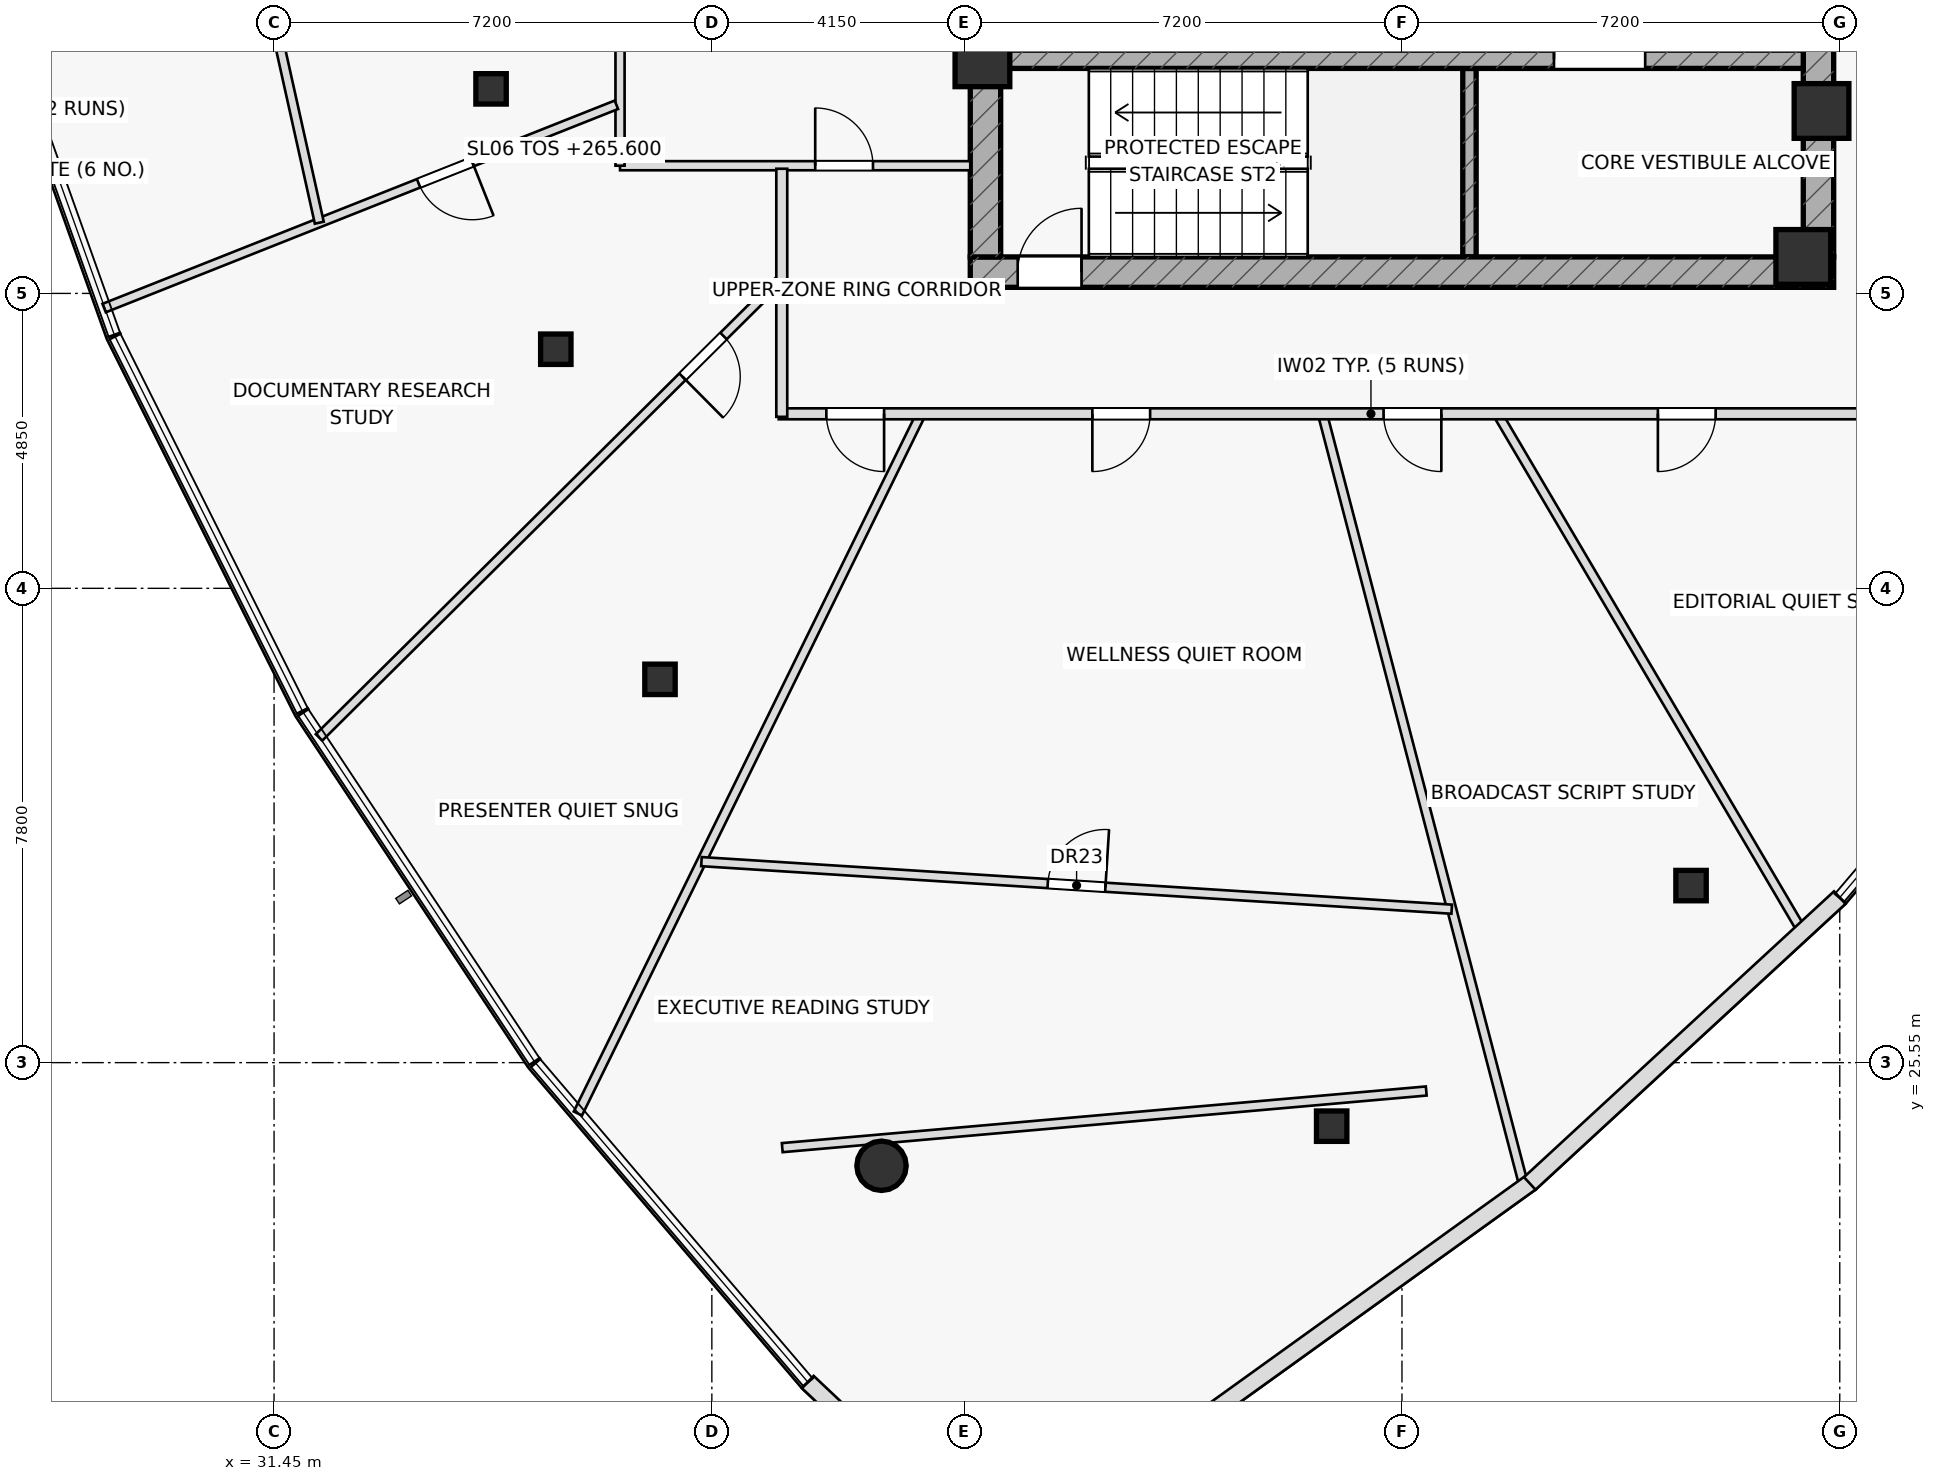
"""IFC4 building model, lengths in metres.
Left out: names, types, materials, properties, quantities, classifications, styles, units other than length and angle.
Written with IfcOpenShell. Run it as: python <this file> out.ifc"""

import sys

from ifc_helpers import new_model, si_unit, direction, frame, frame_2d, origin, origin_2d, place, context, subcontext, project, spatial, rectangle, hollow_rectangle, hollow_circle, extrude, element, fill, save


model = new_model("IFC4")
c1 = context("Model", 3, precision=1e-05, world=origin(), true_north=direction((0.0, 1.0)))
c2 = subcontext(c1, "Body", "Model", "MODEL_VIEW")
j1 = project(units=[si_unit("LENGTHUNIT", "METRE"), si_unit("PLANEANGLEUNIT", "RADIAN")], contexts=[c1])
p1 = place(None, origin())
s1 = spatial("IfcSite", under=j1, at=p1, CompositionType="ELEMENT")
p2 = place(p1, origin())
s2 = spatial("IfcBuilding", under=s1, at=p2, CompositionType="ELEMENT")
p3 = place(p2, frame((0.0, 0.0, 265.6)))
s3 = spatial("IfcBuildingStorey", under=s2, at=p3, CompositionType="ELEMENT", Elevation=265.6)
p4 = place(p3, frame((51.11, 38.8, 0.0), z_axis=(0.0, 0.0, 1.0), x_axis=(0.0, 1.0, 0.0)))
e1 = element("IfcWall", 1, at=p4, inside=s3, PredefinedType="SHEAR", context=c2, shape_type="SweptSolid", body=[
    extrude(rectangle(XDim=3.1, YDim=0.22, at=frame_2d((1.55, 0.0))), origin(), (0.0, 0.0, 1.0), 3.65),
])
p5 = place(p3, frame((42.9, 38.55, 0.0), z_axis=(0.0, 0.0, 1.0), x_axis=(1.0, 0.0, 0.0)))
e2 = element("IfcWall", 2, at=p5, inside=s3, PredefinedType="SHEAR", context=c2, shape_type="SweptSolid", body=[
    extrude(rectangle(XDim=14.2, YDim=0.5, at=frame_2d((7.1, 0.0))), origin(), (0.0, 0.0, 1.0), 3.65),
])
p6 = place(p5, frame((0.78, 0.0, 0.0)))
e3 = element("IfcOpeningElement", 3, at=p6, cuts=e2, PredefinedType="OPENING", context=c2, shape_type="SweptSolid", body=[
    extrude(rectangle(XDim=1.05, YDim=2.2, at=frame_2d((0.525, 1.1))), frame((0.0, 0.26, 0.0), z_axis=(0.0, -1.0, 0.0), x_axis=(1.0, 0.0, 0.0)), (0.0, 0.0, 1.0), 0.52),
])
p7 = place(p3, frame((43.15, 38.8, 0.0), z_axis=(0.0, 0.0, 1.0), x_axis=(0.0, 1.0, 0.0)))
e4 = element("IfcWall", 4, at=p7, inside=s3, PredefinedType="SHEAR", context=c2, shape_type="SweptSolid", body=[
    extrude(rectangle(XDim=12.4, YDim=0.5, at=frame_2d((6.2, 0.0))), origin(), (0.0, 0.0, 1.0), 3.65),
])
p8 = place(p3, frame((56.85, 38.8, 0.0), z_axis=(0.0, 0.0, 1.0), x_axis=(0.0, 1.0, 0.0)))
e5 = element("IfcWall", 5, at=p8, inside=s3, PredefinedType="SHEAR", context=c2, shape_type="SweptSolid", body=[
    extrude(rectangle(XDim=12.4, YDim=0.5, at=frame_2d((6.2, 0.0))), origin(), (0.0, 0.0, 1.0), 3.65),
])
p9 = place(p8, frame((3.85, 0.0, 0.0)))
e6 = element("IfcOpeningElement", 6, at=p9, cuts=e5, PredefinedType="OPENING", context=c2, shape_type="SweptSolid", body=[
    extrude(rectangle(XDim=1.5, YDim=2.2, at=frame_2d((0.75, 1.1))), frame((0.0, 0.26, 0.0), z_axis=(0.0, -1.0, 0.0), x_axis=(1.0, 0.0, 0.0)), (0.0, 0.0, 1.0), 0.52),
])
p10 = place(p3, frame((43.4, 42.05, 0.0), z_axis=(0.0, 0.0, 1.0), x_axis=(1.0, 0.0, 0.0)))
e7 = element("IfcWall", 7, at=p10, inside=s3, PredefinedType="SHEAR", context=c2, shape_type="SweptSolid", body=[
    extrude(rectangle(XDim=13.2, YDim=0.3, at=frame_2d((6.6, 0.0))), origin(), (0.0, 0.0, 1.0), 3.65),
])
p11 = place(p10, frame((9.1, 0.0, 0.0)))
e8 = element("IfcOpeningElement", 8, at=p11, cuts=e7, PredefinedType="OPENING", context=c2, shape_type="SweptSolid", body=[
    extrude(rectangle(XDim=1.5, YDim=2.2, at=frame_2d((0.75, 1.1))), frame((0.0, 0.16, 0.0), z_axis=(0.0, -1.0, 0.0), x_axis=(1.0, 0.0, 0.0)), (0.0, 0.0, 1.0), 0.32),
])
for number, where, z_axis, x_axis in (
    (9, (43.1, 42.05, 0.0), (0.0, 0.0, 1.0), (1.0, 0.0, 0.0)),
    (10, (56.9, 41.2, 0.0), (0.0, 0.0, 1.0), (1.0, 0.0, 0.0)),
    (11, (56.6, 38.8, 0.0), (0.0, 0.0, 1.0), (1.0, 0.0, 0.0)),
):
    element("IfcColumn", number, at=place(p3, frame(where, z_axis=z_axis, x_axis=x_axis)), inside=s3, PredefinedType="COLUMN", context=c2, shape_type="SweptSolid", body=[
        extrude(rectangle(XDim=0.9, YDim=0.9, at=origin_2d()), origin(), (0.0, 0.0, 1.0), 3.65),
    ])
for number, where, z_axis, x_axis in (
    (12, (35.019, 41.564, 0.0), (0.0, 0.0, 1.0), (1.0, 0.0, 0.0)),
    (13, (36.083, 37.282, 0.0), (0.0, 0.0, 1.0), (1.0, 0.0, 0.0)),
    (14, (37.797, 31.853, 0.0), (0.0, 0.0, 1.0), (1.0, 0.0, 0.0)),
):
    element("IfcColumn", number, at=place(p3, frame(where, z_axis=z_axis, x_axis=x_axis)), inside=s3, PredefinedType="COLUMN", context=c2, shape_type="SweptSolid", body=[
        extrude(hollow_rectangle(XDim=0.5, YDim=0.5, WallThickness=0.03, at=origin_2d()), origin(), (0.0, 0.0, 1.0), 3.65),
    ])
p12 = place(p3, frame((41.44, 23.854, 0.0), z_axis=(0.0, 0.0, 1.0), x_axis=(1.0, 0.0, 0.0)))
e15 = element("IfcColumn", 15, at=p12, inside=s3, PredefinedType="COLUMN", context=c2, shape_type="SweptSolid", body=[
    extrude(hollow_circle(Radius=0.406, WallThickness=0.036, at=origin_2d()), origin(), (0.0, 0.0, 1.0), 3.65),
])
for number, where, z_axis, x_axis in (
    (16, (48.844, 24.505, 0.0), (0.0, 0.0, 1.0), (1.0, 0.0, 0.0)),
    (17, (54.754, 28.462, 0.0), (0.0, 0.0, 1.0), (1.0, 0.0, 0.0)),
):
    element("IfcColumn", number, at=place(p3, frame(where, z_axis=z_axis, x_axis=x_axis)), inside=s3, PredefinedType="COLUMN", context=c2, shape_type="SweptSolid", body=[
        extrude(hollow_rectangle(XDim=0.5, YDim=0.5, WallThickness=0.03, at=origin_2d()), origin(), (0.0, 0.0, 1.0), 3.65),
    ])
p13 = place(p3, frame((39.808, 24.152, 0.0), z_axis=(0.0, 0.0, 1.0), x_axis=(0.996153584085, 0.087624408208, 0.0)))
e18 = element("IfcWall", 18, at=p13, inside=s3, PredefinedType="PARTITIONING", context=c2, shape_type="SweptSolid", body=[
    extrude(rectangle(XDim=10.632, YDim=0.15, at=frame_2d((5.316, 0.0))), origin(), (0.0, 0.0, 1.0), 3.175),
])
p14 = place(p3, frame((37.14, 40.3, 0.0), z_axis=(0.0, 0.0, 1.0), x_axis=(1.0, 0.0, 0.0)))
e19 = element("IfcWall", 19, at=p14, inside=s3, PredefinedType="PARTITIONING", context=c2, shape_type="SweptSolid", body=[
    extrude(rectangle(XDim=5.76, YDim=0.15, at=frame_2d((2.88, 0.0))), origin(), (0.0, 0.0, 1.0), 3.075),
])
p15 = place(p14, frame((3.21, 0.0, 0.0)))
e20 = element("IfcOpeningElement", 20, at=p15, cuts=e19, PredefinedType="OPENING", context=c2, shape_type="SweptSolid", body=[
    extrude(rectangle(XDim=0.95, YDim=2.05, at=frame_2d((0.475, 1.025))), frame((0.0, 0.085, 0.0), z_axis=(0.0, -1.0, 0.0), x_axis=(1.0, 0.0, 0.0)), (0.0, 0.0, 1.0), 0.17),
])
p16 = place(p3, frame((37.14, 40.3, 0.0), z_axis=(0.0, 0.0, 1.0), x_axis=(0.0, 1.0, 0.0)))
e21 = element("IfcWall", 21, at=p16, inside=s3, PredefinedType="PARTITIONING", context=c2, shape_type="SweptSolid", body=[
    extrude(rectangle(XDim=7.58, YDim=0.15, at=frame_2d((3.79, 0.0))), origin(), (0.0, 0.0, 1.0), 3.65),
])
p17 = place(p3, frame((37.08, 41.302, 0.0), z_axis=(0.0, 0.0, 1.0), x_axis=(-0.929502291, -0.368816337797, 0.0)))
e22 = element("IfcWall", 22, at=p17, inside=s3, PredefinedType="PARTITIONING", context=c2, shape_type="SweptSolid", body=[
    extrude(rectangle(XDim=9.063, YDim=0.15, at=frame_2d((4.532, 0.0))), origin(), (0.0, 0.0, 1.0), 3.075),
])
p18 = place(p17, frame((2.55, 0.0, 0.0)))
e23 = element("IfcOpeningElement", 23, at=p18, cuts=e22, PredefinedType="OPENING", context=c2, shape_type="SweptSolid", body=[
    extrude(rectangle(XDim=0.95, YDim=2.05, at=frame_2d((0.475, 1.025))), frame((0.0, 0.085, 0.0), z_axis=(0.0, -1.0, 0.0), x_axis=(1.0, 0.0, 0.0)), (0.0, 0.0, 1.0), 0.17),
])
p19 = place(p3, frame((39.8, 38.45, 0.0), z_axis=(0.0, 0.0, 1.0), x_axis=(-0.709811227193, -0.704391951793, 0.0)))
e24 = element("IfcWall", 24, at=p19, inside=s3, PredefinedType="PARTITIONING", context=c2, shape_type="SweptSolid", body=[
    extrude(rectangle(XDim=10.722, YDim=0.15, at=frame_2d((5.361, 0.0))), origin(), (0.0, 0.0, 1.0), 3.075),
])
p20 = place(p19, frame((1.35, 0.0, 0.0)))
e25 = element("IfcOpeningElement", 25, at=p20, cuts=e24, PredefinedType="OPENING", context=c2, shape_type="SweptSolid", body=[
    extrude(rectangle(XDim=0.95, YDim=2.05, at=frame_2d((0.475, 1.025))), frame((0.0, 0.085, 0.0), z_axis=(0.0, -1.0, 0.0), x_axis=(1.0, 0.0, 0.0)), (0.0, 0.0, 1.0), 0.17),
])
p21 = place(p3, frame((42.092, 36.22, 0.0), z_axis=(0.0, 0.0, 1.0), x_axis=(-0.440465548738, -0.89776951406, 0.0)))
e26 = element("IfcWall", 26, at=p21, inside=s3, PredefinedType="PARTITIONING", context=c2, shape_type="SweptSolid", body=[
    extrude(rectangle(XDim=12.817, YDim=0.15, at=frame_2d((6.409, 0.0))), origin(), (0.0, 0.0, 1.0), 3.175),
])
p22 = place(p3, frame((48.692, 36.22, 0.0), z_axis=(0.0, 0.0, 1.0), x_axis=(0.252552587475, -0.967583169841, 0.0)))
e27 = element("IfcWall", 27, at=p22, inside=s3, PredefinedType="PARTITIONING", context=c2, shape_type="SweptSolid", body=[
    extrude(rectangle(XDim=13.156, YDim=0.15, at=frame_2d((6.578, 0.0))), origin(), (0.0, 0.0, 1.0), 3.175),
])
p23 = place(p3, frame((51.571, 36.22, 0.0), z_axis=(0.0, 0.0, 1.0), x_axis=(0.507452319083, -0.861679838372, 0.0)))
e28 = element("IfcWall", 28, at=p23, inside=s3, PredefinedType="PARTITIONING", context=c2, shape_type="SweptSolid", body=[
    extrude(rectangle(XDim=9.898, YDim=0.15, at=frame_2d((4.949, 0.0))), origin(), (0.0, 0.0, 1.0), 3.075),
])
p24 = place(p3, frame((30.413, 47.355, 0.0), z_axis=(0.0, 0.0, 1.0), x_axis=(0.217501820027, -0.976059915315, 0.0)))
e29 = element("IfcWall", 29, at=p24, inside=s3, PredefinedType="PARTITIONING", context=c2, shape_type="SweptSolid", body=[
    extrude(rectangle(XDim=8.188, YDim=0.15, at=frame_2d((4.094, 0.0))), origin(), (0.0, 0.0, 1.0), 3.65),
])
p25 = place(p24, frame((3.619, 0.0, 0.0)))
e30 = element("IfcOpeningElement", 30, at=p25, cuts=e29, PredefinedType="OPENING", context=c2, shape_type="SweptSolid", body=[
    extrude(rectangle(XDim=0.95, YDim=2.05, at=frame_2d((0.475, 1.025))), frame((0.0, 0.085, 0.0), z_axis=(0.0, -1.0, 0.0), x_axis=(1.0, 0.0, 0.0)), (0.0, 0.0, 1.0), 0.17),
])
p26 = place(p3, frame((38.479, 28.856, 0.0), z_axis=(0.0, 0.0, 1.0), x_axis=(0.997995384926, -0.063286741629, 0.0)))
e31 = element("IfcWall", 31, at=p26, inside=s3, PredefinedType="PARTITIONING", context=c2, shape_type="SweptSolid", body=[
    extrude(rectangle(XDim=12.364, YDim=0.15, at=frame_2d((6.182, 0.0))), origin(), (0.0, 0.0, 1.0), 3.175),
])
p27 = place(p26, frame((5.707, 0.0, 0.0)))
e32 = element("IfcOpeningElement", 32, at=p27, cuts=e31, PredefinedType="OPENING", context=c2, shape_type="SweptSolid", body=[
    extrude(rectangle(XDim=0.95, YDim=2.05, at=frame_2d((0.475, 1.025))), frame((0.0, 0.085, 0.0), z_axis=(0.0, -1.0, 0.0), x_axis=(1.0, 0.0, 0.0)), (0.0, 0.0, 1.0), 0.17),
])
p28 = place(p3, frame((59.23, 36.22, 0.0), z_axis=(0.0, 0.0, 1.0), x_axis=(-1.0, 0.0, 0.0)))
e33 = element("IfcWall", 33, at=p28, inside=s3, PredefinedType="PARTITIONING", context=c2, shape_type="SweptSolid", body=[
    extrude(rectangle(XDim=19.48, YDim=0.18, at=frame_2d((9.74, 0.0))), origin(), (0.0, 0.0, 1.0), 3.075),
])
p29 = place(p28, frame((4.071, 0.0, 0.0)))
e34 = element("IfcOpeningElement", 34, at=p29, cuts=e33, PredefinedType="OPENING", context=c2, shape_type="SweptSolid", body=[
    extrude(rectangle(XDim=0.95, YDim=2.05, at=frame_2d((0.475, 1.025))), frame((0.0, 0.1, 0.0), z_axis=(0.0, -1.0, 0.0), x_axis=(1.0, 0.0, 0.0)), (0.0, 0.0, 1.0), 0.2),
])
p30 = place(p28, frame((8.583, 0.0, 0.0)))
e35 = element("IfcOpeningElement", 35, at=p30, cuts=e33, PredefinedType="OPENING", context=c2, shape_type="SweptSolid", body=[
    extrude(rectangle(XDim=0.95, YDim=2.05, at=frame_2d((0.475, 1.025))), frame((0.0, 0.1, 0.0), z_axis=(0.0, -1.0, 0.0), x_axis=(1.0, 0.0, 0.0)), (0.0, 0.0, 1.0), 0.2),
])
p31 = place(p28, frame((13.372, 0.0, 0.0)))
e36 = element("IfcOpeningElement", 36, at=p31, cuts=e33, PredefinedType="OPENING", context=c2, shape_type="SweptSolid", body=[
    extrude(rectangle(XDim=0.95, YDim=2.05, at=frame_2d((0.475, 1.025))), frame((0.0, 0.1, 0.0), z_axis=(0.0, -1.0, 0.0), x_axis=(1.0, 0.0, 0.0)), (0.0, 0.0, 1.0), 0.2),
])
p32 = place(p28, frame((17.747, 0.0, 0.0)))
e37 = element("IfcOpeningElement", 37, at=p32, cuts=e33, PredefinedType="OPENING", context=c2, shape_type="SweptSolid", body=[
    extrude(rectangle(XDim=0.95, YDim=2.05, at=frame_2d((0.475, 1.025))), frame((0.0, 0.1, 0.0), z_axis=(0.0, -1.0, 0.0), x_axis=(1.0, 0.0, 0.0)), (0.0, 0.0, 1.0), 0.2),
])
p33 = place(p3, frame((39.8, 36.17, 0.0), z_axis=(0.0, 0.0, 1.0), x_axis=(0.0, 1.0, 0.0)))
e38 = element("IfcWall", 38, at=p33, inside=s3, PredefinedType="PARTITIONING", context=c2, shape_type="SweptSolid", body=[
    extrude(rectangle(XDim=4.08, YDim=0.18, at=frame_2d((2.04, 0.0))), origin(), (0.0, 0.0, 1.0), 3.355),
])
p34 = place(p3, frame((40.228, 20.297, 0.0), z_axis=(0.0, 0.0, 1.0), x_axis=(0.727129573075, -0.686500243233, 0.0)))
e39 = element("IfcWall", 39, at=p34, inside=s3, PredefinedType="STANDARD", context=c2, shape_type="SweptSolid", body=[
    extrude(rectangle(XDim=1.803, YDim=0.28, at=frame_2d((0.901, 0.0))), origin(), (0.0, 0.0, 1.0), 3.65),
])
p35 = place(p3, frame((46.486, 19.527, 0.0), z_axis=(0.0, 0.0, 1.0), x_axis=(0.811838879728, 0.583881523396, 0.0)))
e40 = element("IfcWall", 40, at=p35, inside=s3, PredefinedType="STANDARD", context=c2, shape_type="SweptSolid", body=[
    extrude(rectangle(XDim=6.947, YDim=0.28, at=frame_2d((3.473, 0.0))), origin(), (0.0, 0.0, 1.0), 3.65),
])
p36 = place(p3, frame((52.102, 23.564, 0.0), z_axis=(0.0, 0.0, 1.0), x_axis=(0.735217687078, 0.677831064948, 0.0)))
e41 = element("IfcWall", 41, at=p36, inside=s3, PredefinedType="STANDARD", context=c2, shape_type="SweptSolid", body=[
    extrude(rectangle(XDim=6.935, YDim=0.28, at=frame_2d((3.467, 0.0))), origin(), (0.0, 0.0, 1.0), 3.65),
])
p37 = place(p6, origin())
e42 = element("IfcDoor", 42, at=p37, inside=s3, OperationType="SINGLE_SWING_RIGHT", PredefinedType="DOOR", context=c2, shape_type="SweptSolid", body=[
    extrude(rectangle(XDim=1.05, YDim=2.2, at=frame_2d((0.525, 1.1))), frame((0.0, 0.025, 0.0), z_axis=(0.0, -1.0, 0.0), x_axis=(1.0, 0.0, 0.0)), (0.0, 0.0, 1.0), 0.05),
])
fill(e3, e42)
p38 = place(p11, origin())
e43 = element("IfcDoor", 43, at=p38, inside=s3, OperationType="SINGLE_SWING_LEFT", PredefinedType="DOOR", context=c2, shape_type="SweptSolid", body=[
    extrude(rectangle(XDim=1.5, YDim=2.2, at=frame_2d((0.75, 1.1))), frame((0.0, 0.025, 0.0), z_axis=(0.0, -1.0, 0.0), x_axis=(1.0, 0.0, 0.0)), (0.0, 0.0, 1.0), 0.05),
])
fill(e8, e43)
p39 = place(p15, origin())
e44 = element("IfcDoor", 44, at=p39, inside=s3, OperationType="SINGLE_SWING_LEFT", PredefinedType="DOOR", context=c2, shape_type="SweptSolid", body=[
    extrude(rectangle(XDim=0.95, YDim=2.05, at=frame_2d((0.475, 1.025))), frame((0.0, 0.025, 0.0), z_axis=(0.0, -1.0, 0.0), x_axis=(1.0, 0.0, 0.0)), (0.0, 0.0, 1.0), 0.05),
])
fill(e20, e44)
p40 = place(p18, origin())
e45 = element("IfcDoor", 45, at=p40, inside=s3, OperationType="SINGLE_SWING_LEFT", PredefinedType="DOOR", context=c2, shape_type="SweptSolid", body=[
    extrude(rectangle(XDim=0.95, YDim=2.05, at=frame_2d((0.475, 1.025))), frame((0.0, 0.025, 0.0), z_axis=(0.0, -1.0, 0.0), x_axis=(1.0, 0.0, 0.0)), (0.0, 0.0, 1.0), 0.05),
])
fill(e23, e45)
p41 = place(p20, origin())
e46 = element("IfcDoor", 46, at=p41, inside=s3, OperationType="SINGLE_SWING_RIGHT", PredefinedType="DOOR", context=c2, shape_type="SweptSolid", body=[
    extrude(rectangle(XDim=0.95, YDim=2.05, at=frame_2d((0.475, 1.025))), frame((0.0, 0.025, 0.0), z_axis=(0.0, -1.0, 0.0), x_axis=(1.0, 0.0, 0.0)), (0.0, 0.0, 1.0), 0.05),
])
fill(e25, e46)
p42 = place(p27, origin())
e47 = element("IfcDoor", 47, at=p42, inside=s3, OperationType="SINGLE_SWING_RIGHT", PredefinedType="DOOR", context=c2, shape_type="SweptSolid", body=[
    extrude(rectangle(XDim=0.95, YDim=2.05, at=frame_2d((0.475, 1.025))), frame((0.0, 0.025, 0.0), z_axis=(0.0, -1.0, 0.0), x_axis=(1.0, 0.0, 0.0)), (0.0, 0.0, 1.0), 0.05),
])
fill(e32, e47)
p43 = place(p29, origin())
e48 = element("IfcDoor", 48, at=p43, inside=s3, OperationType="SINGLE_SWING_RIGHT", PredefinedType="DOOR", context=c2, shape_type="SweptSolid", body=[
    extrude(rectangle(XDim=0.95, YDim=2.05, at=frame_2d((0.475, 1.025))), frame((0.0, 0.025, 0.0), z_axis=(0.0, -1.0, 0.0), x_axis=(1.0, 0.0, 0.0)), (0.0, 0.0, 1.0), 0.05),
])
fill(e34, e48)
p44 = place(p30, origin())
e49 = element("IfcDoor", 49, at=p44, inside=s3, OperationType="SINGLE_SWING_LEFT", PredefinedType="DOOR", context=c2, shape_type="SweptSolid", body=[
    extrude(rectangle(XDim=0.95, YDim=2.05, at=frame_2d((0.475, 1.025))), frame((0.0, 0.025, 0.0), z_axis=(0.0, -1.0, 0.0), x_axis=(1.0, 0.0, 0.0)), (0.0, 0.0, 1.0), 0.05),
])
fill(e35, e49)
p45 = place(p31, origin())
e50 = element("IfcDoor", 50, at=p45, inside=s3, OperationType="SINGLE_SWING_RIGHT", PredefinedType="DOOR", context=c2, shape_type="SweptSolid", body=[
    extrude(rectangle(XDim=0.95, YDim=2.05, at=frame_2d((0.475, 1.025))), frame((0.0, 0.025, 0.0), z_axis=(0.0, -1.0, 0.0), x_axis=(1.0, 0.0, 0.0)), (0.0, 0.0, 1.0), 0.05),
])
fill(e36, e50)
p46 = place(p32, origin())
e51 = element("IfcDoor", 51, at=p46, inside=s3, OperationType="SINGLE_SWING_LEFT", PredefinedType="DOOR", context=c2, shape_type="SweptSolid", body=[
    extrude(rectangle(XDim=0.95, YDim=2.05, at=frame_2d((0.475, 1.025))), frame((0.0, 0.025, 0.0), z_axis=(0.0, -1.0, 0.0), x_axis=(1.0, 0.0, 0.0)), (0.0, 0.0, 1.0), 0.05),
])
fill(e37, e51)
save(model, sys.argv[1])
